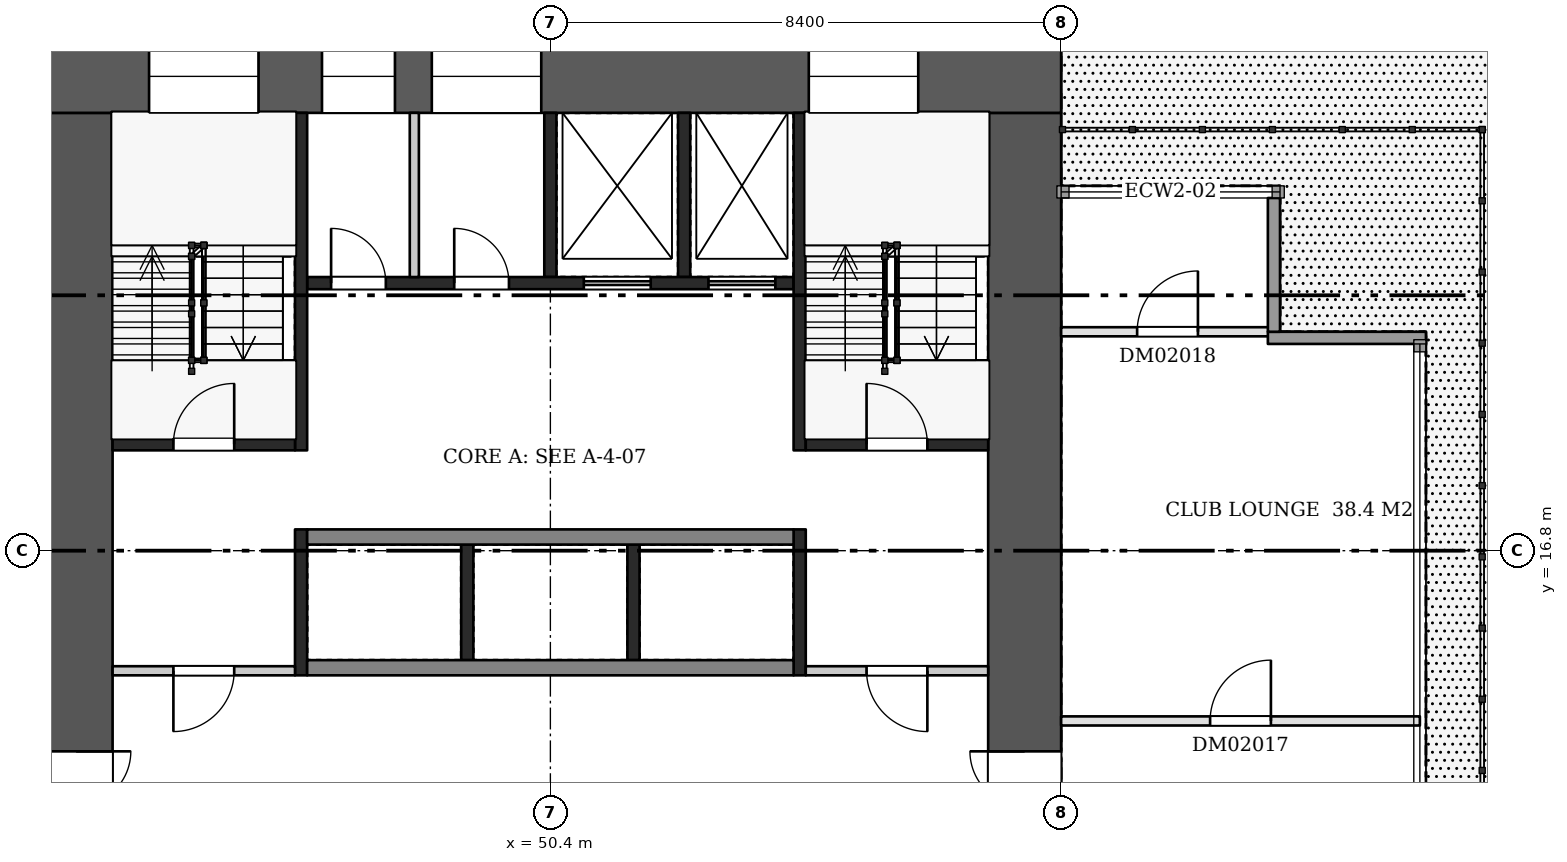
"""IFC4 building model, lengths in metres.
Left out: names, types, materials, properties, quantities, classifications, styles, units other than length and angle.
Written with IfcOpenShell. Run it as: python <this file> out.ifc"""

import sys

from ifc_helpers import new_model, si_unit, direction, frame, frame_2d, origin, place, context, subcontext, project, spatial, rectangle, extrude, element, fill, save


model = new_model("IFC4")
c1 = context("Model", 3, precision=1e-05, world=origin(), true_north=direction((0.0, 1.0)))
c2 = subcontext(c1, "Body", "Model", "MODEL_VIEW")
j1 = project(units=[si_unit("LENGTHUNIT", "METRE"), si_unit("PLANEANGLEUNIT", "RADIAN")], contexts=[c1])
p1 = place(None, origin())
s1 = spatial("IfcSite", under=j1, at=p1, CompositionType="ELEMENT")
p2 = place(p1, origin())
s2 = spatial("IfcBuilding", under=s1, at=p2, CompositionType="ELEMENT")
p3 = place(p2, frame((0.0, 0.0, 14.4)))
s3 = spatial("IfcBuildingStorey", under=s2, at=p3, CompositionType="ELEMENT", Elevation=14.4)
p4 = place(p3, frame((42.0, 24.6, 0.0), z_axis=(0.0, 0.0, 1.0), x_axis=(1.0, 0.0, 0.0)))
e1 = element("IfcWall", 1, at=p4, inside=s3, PredefinedType="SHEAR", context=c2, shape_type="SweptSolid", body=[
    extrude(rectangle(XDim=16.8, YDim=1.2, at=frame_2d((8.4, 0.0))), origin(), (0.0, 0.0, 1.0), 5.1),
])
p5 = place(p4, frame((1.8, 0.0, 0.5)))
e2 = element("IfcOpeningElement", 2, at=p5, cuts=e1, PredefinedType="OPENING", context=c2, shape_type="SweptSolid", body=[
    extrude(rectangle(XDim=1.8, YDim=2.4, at=frame_2d((0.9, 1.2))), frame((0.0, 0.61, 0.0), z_axis=(0.0, -1.0, 0.0), x_axis=(1.0, 0.0, 0.0)), (0.0, 0.0, 1.0), 1.22),
])
p6 = place(p4, frame((4.644, 0.0, 1.6)))
e3 = element("IfcOpeningElement", 3, at=p6, cuts=e1, PredefinedType="OPENING", context=c2, shape_type="SweptSolid", body=[
    extrude(rectangle(XDim=1.2, YDim=1.2, at=frame_2d((0.6, 0.6))), frame((0.0, 0.61, 0.0), z_axis=(0.0, -1.0, 0.0), x_axis=(1.0, 0.0, 0.0)), (0.0, 0.0, 1.0), 1.22),
])
p7 = place(p4, frame((6.45, 0.0, 1.6)))
e4 = element("IfcOpeningElement", 4, at=p7, cuts=e1, PredefinedType="OPENING", context=c2, shape_type="SweptSolid", body=[
    extrude(rectangle(XDim=1.8, YDim=1.2, at=frame_2d((0.9, 0.6))), frame((0.0, 0.61, 0.0), z_axis=(0.0, -1.0, 0.0), x_axis=(1.0, 0.0, 0.0)), (0.0, 0.0, 1.0), 1.22),
])
p8 = place(p4, frame((12.65, 0.0, 0.5)))
e5 = element("IfcOpeningElement", 5, at=p8, cuts=e1, PredefinedType="OPENING", context=c2, shape_type="SweptSolid", body=[
    extrude(rectangle(XDim=1.8, YDim=2.4, at=frame_2d((0.9, 1.2))), frame((0.0, 0.61, 0.0), z_axis=(0.0, -1.0, 0.0), x_axis=(1.0, 0.0, 0.0)), (0.0, 0.0, 1.0), 1.22),
])
p9 = place(p3, frame((42.6, 9.6, 0.0), z_axis=(0.0, 0.0, 1.0), x_axis=(0.0, 1.0, 0.0)))
e6 = element("IfcWall", 6, at=p9, inside=s3, PredefinedType="SHEAR", context=c2, shape_type="SweptSolid", body=[
    extrude(rectangle(XDim=14.4, YDim=1.2, at=frame_2d((7.2, 0.0))), origin(), (0.0, 0.0, 1.0), 5.1),
])
p10 = place(p9, frame((2.1, 0.0, 0.0)))
e7 = element("IfcOpeningElement", 7, at=p10, cuts=e6, PredefinedType="OPENING", context=c2, shape_type="SweptSolid", body=[
    extrude(rectangle(XDim=1.8, YDim=2.1, at=frame_2d((0.9, 1.05))), frame((0.0, 0.61, 0.0), z_axis=(0.0, -1.0, 0.0), x_axis=(1.0, 0.0, 0.0)), (0.0, 0.0, 1.0), 1.22),
])
p11 = place(p3, frame((58.2, 9.6, 0.0), z_axis=(0.0, 0.0, 1.0), x_axis=(0.0, 1.0, 0.0)))
e8 = element("IfcWall", 8, at=p11, inside=s3, PredefinedType="SHEAR", context=c2, shape_type="SweptSolid", body=[
    extrude(rectangle(XDim=14.4, YDim=1.2, at=frame_2d((7.2, 0.0))), origin(), (0.0, 0.0, 1.0), 5.1),
])
p12 = place(p11, frame((2.1, 0.0, 0.0)))
e9 = element("IfcOpeningElement", 9, at=p12, cuts=e8, PredefinedType="OPENING", context=c2, shape_type="SweptSolid", body=[
    extrude(rectangle(XDim=1.8, YDim=2.1, at=frame_2d((0.9, 1.05))), frame((0.0, 0.61, 0.0), z_axis=(0.0, -1.0, 0.0), x_axis=(1.0, 0.0, 0.0)), (0.0, 0.0, 1.0), 1.22),
])
for number, where, z_axis, x_axis in (
    (10, (49.033, 15.0, 0.0), (0.0, 0.0, 1.0), (0.0, 1.0, 0.0)),
    (11, (51.767, 15.0, 0.0), (0.0, 0.0, 1.0), (0.0, 1.0, 0.0)),
):
    element("IfcWall", number, at=place(p3, frame(where, z_axis=z_axis, x_axis=x_axis)), inside=s3, PredefinedType="SHEAR", context=c2, shape_type="SweptSolid", body=[
        extrude(rectangle(XDim=1.9, YDim=0.2, at=frame_2d((0.95, 0.0))), origin(), (0.0, 0.0, 1.0), 5.1),
    ])
for number, where, z_axis, x_axis in (
    (12, (46.4, 14.875, 0.0), (0.0, 0.0, 1.0), (1.0, 0.0, 0.0)),
    (13, (46.4, 17.025, 0.0), (0.0, 0.0, 1.0), (1.0, 0.0, 0.0)),
):
    element("IfcWall", number, at=place(p3, frame(where, z_axis=z_axis, x_axis=x_axis)), inside=s3, PredefinedType="SHEAR", context=c2, shape_type="SweptSolid", body=[
        extrude(rectangle(XDim=8.0, YDim=0.25, at=frame_2d((4.0, 0.0))), origin(), (0.0, 0.0, 1.0), 5.1),
    ])
for number, where, z_axis, x_axis in (
    (14, (50.4, 21.3, 0.0), (0.0, 0.0, 1.0), (0.0, 1.0, 0.0)),
    (15, (52.6, 21.3, 0.0), (0.0, 0.0, 1.0), (0.0, 1.0, 0.0)),
):
    element("IfcWall", number, at=place(p3, frame(where, z_axis=z_axis, x_axis=x_axis)), inside=s3, PredefinedType="SHEAR", context=c2, shape_type="SweptSolid", body=[
        extrude(rectangle(XDim=2.7, YDim=0.2, at=frame_2d((1.35, 0.0))), origin(), (0.0, 0.0, 1.0), 5.1),
    ])
p13 = place(p3, frame((48.163, 21.3, 0.0), z_axis=(0.0, 0.0, 1.0), x_axis=(0.0, 1.0, 0.0)))
e16 = element("IfcWall", 16, at=p13, inside=s3, PredefinedType="PARTITIONING", context=c2, shape_type="SweptSolid", body=[
    extrude(rectangle(XDim=2.7, YDim=0.15, at=frame_2d((1.35, 0.0))), origin(), (0.0, 0.0, 1.0), 5.1),
])
p14 = place(p3, frame((46.4, 21.2, 0.0), z_axis=(0.0, 0.0, 1.0), x_axis=(1.0, 0.0, 0.0)))
e17 = element("IfcWall", 17, at=p14, inside=s3, PredefinedType="SHEAR", context=c2, shape_type="SweptSolid", body=[
    extrude(rectangle(XDim=8.0, YDim=0.2, at=frame_2d((4.0, 0.0))), origin(), (0.0, 0.0, 1.0), 5.1),
])
p15 = place(p14, frame((0.394, 0.0, 0.0)))
e18 = element("IfcOpeningElement", 18, at=p15, cuts=e17, PredefinedType="OPENING", context=c2, shape_type="SweptSolid", body=[
    extrude(rectangle(XDim=0.9, YDim=2.1, at=frame_2d((0.45, 1.05))), frame((0.0, 0.11, 0.0), z_axis=(0.0, -1.0, 0.0), x_axis=(1.0, 0.0, 0.0)), (0.0, 0.0, 1.0), 0.22),
])
p16 = place(p14, frame((2.419, 0.0, 0.0)))
e19 = element("IfcOpeningElement", 19, at=p16, cuts=e17, PredefinedType="OPENING", context=c2, shape_type="SweptSolid", body=[
    extrude(rectangle(XDim=0.9, YDim=2.1, at=frame_2d((0.45, 1.05))), frame((0.0, 0.11, 0.0), z_axis=(0.0, -1.0, 0.0), x_axis=(1.0, 0.0, 0.0)), (0.0, 0.0, 1.0), 0.22),
])
p17 = place(p14, frame((4.55, 0.0, 0.0)))
e20 = element("IfcOpeningElement", 20, at=p17, cuts=e17, PredefinedType="OPENING", context=c2, shape_type="SweptSolid", body=[
    extrude(rectangle(XDim=1.1, YDim=2.1, at=frame_2d((0.55, 1.05))), frame((0.0, 0.11, 0.0), z_axis=(0.0, -1.0, 0.0), x_axis=(1.0, 0.0, 0.0)), (0.0, 0.0, 1.0), 0.22),
])
p18 = place(p14, frame((6.6, 0.0, 0.0)))
e21 = element("IfcOpeningElement", 21, at=p18, cuts=e17, PredefinedType="OPENING", context=c2, shape_type="SweptSolid", body=[
    extrude(rectangle(XDim=1.1, YDim=2.1, at=frame_2d((0.55, 1.05))), frame((0.0, 0.11, 0.0), z_axis=(0.0, -1.0, 0.0), x_axis=(1.0, 0.0, 0.0)), (0.0, 0.0, 1.0), 0.22),
])
p19 = place(p3, frame((46.3, 14.75, 0.0), z_axis=(0.0, 0.0, 1.0), x_axis=(0.0, 1.0, 0.0)))
e22 = element("IfcWall", 22, at=p19, inside=s3, PredefinedType="SHEAR", context=c2, shape_type="SweptSolid", body=[
    extrude(rectangle(XDim=2.4, YDim=0.2, at=frame_2d((1.2, 0.0))), origin(), (0.0, 0.0, 1.0), 5.1),
])
p20 = place(p3, frame((46.3, 18.45, 0.0), z_axis=(0.0, 0.0, 1.0), x_axis=(0.0, 1.0, 0.0)))
e23 = element("IfcWall", 23, at=p20, inside=s3, PredefinedType="SHEAR", context=c2, shape_type="SweptSolid", body=[
    extrude(rectangle(XDim=5.55, YDim=0.2, at=frame_2d((2.775, 0.0))), origin(), (0.0, 0.0, 1.0), 5.1),
])
p21 = place(p3, frame((43.2, 14.825, 0.0), z_axis=(0.0, 0.0, 1.0), x_axis=(1.0, 0.0, 0.0)))
e24 = element("IfcWall", 24, at=p21, inside=s3, PredefinedType="PARTITIONING", context=c2, shape_type="SweptSolid", body=[
    extrude(rectangle(XDim=3.0, YDim=0.15, at=frame_2d((1.5, 0.0))), origin(), (0.0, 0.0, 1.0), 5.1),
])
p22 = place(p21, frame((1.0, 0.0, 0.0)))
e25 = element("IfcOpeningElement", 25, at=p22, cuts=e24, PredefinedType="OPENING", context=c2, shape_type="SweptSolid", body=[
    extrude(rectangle(XDim=1.0, YDim=2.1, at=frame_2d((0.5, 1.05))), frame((0.0, 0.085, 0.0), z_axis=(0.0, -1.0, 0.0), x_axis=(1.0, 0.0, 0.0)), (0.0, 0.0, 1.0), 0.17),
])
p23 = place(p3, frame((43.2, 18.55, 0.0), z_axis=(0.0, 0.0, 1.0), x_axis=(1.0, 0.0, 0.0)))
e26 = element("IfcWall", 26, at=p23, inside=s3, PredefinedType="SHEAR", context=c2, shape_type="SweptSolid", body=[
    extrude(rectangle(XDim=3.0, YDim=0.2, at=frame_2d((1.5, 0.0))), origin(), (0.0, 0.0, 1.0), 5.1),
])
p24 = place(p23, frame((1.0, 0.0, 0.0)))
e27 = element("IfcOpeningElement", 27, at=p24, cuts=e26, PredefinedType="OPENING", context=c2, shape_type="SweptSolid", body=[
    extrude(rectangle(XDim=1.0, YDim=2.1, at=frame_2d((0.5, 1.05))), frame((0.0, 0.11, 0.0), z_axis=(0.0, -1.0, 0.0), x_axis=(1.0, 0.0, 0.0)), (0.0, 0.0, 1.0), 0.22),
])
p25 = place(p3, frame((54.5, 14.75, 0.0), z_axis=(0.0, 0.0, 1.0), x_axis=(0.0, 1.0, 0.0)))
e28 = element("IfcWall", 28, at=p25, inside=s3, PredefinedType="SHEAR", context=c2, shape_type="SweptSolid", body=[
    extrude(rectangle(XDim=2.4, YDim=0.2, at=frame_2d((1.2, 0.0))), origin(), (0.0, 0.0, 1.0), 5.1),
])
p26 = place(p3, frame((54.5, 18.45, 0.0), z_axis=(0.0, 0.0, 1.0), x_axis=(0.0, 1.0, 0.0)))
e29 = element("IfcWall", 29, at=p26, inside=s3, PredefinedType="SHEAR", context=c2, shape_type="SweptSolid", body=[
    extrude(rectangle(XDim=5.55, YDim=0.2, at=frame_2d((2.775, 0.0))), origin(), (0.0, 0.0, 1.0), 5.1),
])
p27 = place(p3, frame((54.6, 14.825, 0.0), z_axis=(0.0, 0.0, 1.0), x_axis=(1.0, 0.0, 0.0)))
e30 = element("IfcWall", 30, at=p27, inside=s3, PredefinedType="PARTITIONING", context=c2, shape_type="SweptSolid", body=[
    extrude(rectangle(XDim=3.0, YDim=0.15, at=frame_2d((1.5, 0.0))), origin(), (0.0, 0.0, 1.0), 5.1),
])
p28 = place(p27, frame((1.0, 0.0, 0.0)))
e31 = element("IfcOpeningElement", 31, at=p28, cuts=e30, PredefinedType="OPENING", context=c2, shape_type="SweptSolid", body=[
    extrude(rectangle(XDim=1.0, YDim=2.1, at=frame_2d((0.5, 1.05))), frame((0.0, 0.085, 0.0), z_axis=(0.0, -1.0, 0.0), x_axis=(1.0, 0.0, 0.0)), (0.0, 0.0, 1.0), 0.17),
])
p29 = place(p3, frame((54.6, 18.55, 0.0), z_axis=(0.0, 0.0, 1.0), x_axis=(1.0, 0.0, 0.0)))
e32 = element("IfcWall", 32, at=p29, inside=s3, PredefinedType="SHEAR", context=c2, shape_type="SweptSolid", body=[
    extrude(rectangle(XDim=3.0, YDim=0.2, at=frame_2d((1.5, 0.0))), origin(), (0.0, 0.0, 1.0), 5.1),
])
p30 = place(p29, frame((1.0, 0.0, 0.0)))
e33 = element("IfcOpeningElement", 33, at=p30, cuts=e32, PredefinedType="OPENING", context=c2, shape_type="SweptSolid", body=[
    extrude(rectangle(XDim=1.0, YDim=2.1, at=frame_2d((0.5, 1.05))), frame((0.0, 0.11, 0.0), z_axis=(0.0, -1.0, 0.0), x_axis=(1.0, 0.0, 0.0)), (0.0, 0.0, 1.0), 0.22),
])
p31 = place(p3, frame((58.8, 14.0, 0.0), z_axis=(0.0, 0.0, 1.0), x_axis=(1.0, 0.0, 0.0)))
e34 = element("IfcWall", 34, at=p31, inside=s3, PredefinedType="PARTITIONING", context=c2, shape_type="SweptSolid", body=[
    extrude(rectangle(XDim=5.9, YDim=0.15, at=frame_2d((2.95, 0.0))), origin(), (0.0, 0.0, 1.0), 5.1),
])
p32 = place(p31, frame((2.45, 0.0, 0.0)))
e35 = element("IfcOpeningElement", 35, at=p32, cuts=e34, PredefinedType="OPENING", context=c2, shape_type="SweptSolid", body=[
    extrude(rectangle(XDim=1.0, YDim=2.1, at=frame_2d((0.5, 1.05))), frame((0.0, 0.085, 0.0), z_axis=(0.0, -1.0, 0.0), x_axis=(1.0, 0.0, 0.0)), (0.0, 0.0, 1.0), 0.17),
])
p33 = place(p3, frame((58.8, 20.4, 0.0), z_axis=(0.0, 0.0, 1.0), x_axis=(1.0, 0.0, 0.0)))
e36 = element("IfcWall", 36, at=p33, inside=s3, PredefinedType="PARTITIONING", context=c2, shape_type="SweptSolid", body=[
    extrude(rectangle(XDim=3.5, YDim=0.15, at=frame_2d((1.75, 0.0))), origin(), (0.0, 0.0, 1.0), 5.1),
])
p34 = place(p33, frame((1.25, 0.0, 0.0)))
e37 = element("IfcOpeningElement", 37, at=p34, cuts=e36, PredefinedType="OPENING", context=c2, shape_type="SweptSolid", body=[
    extrude(rectangle(XDim=1.0, YDim=2.1, at=frame_2d((0.5, 1.05))), frame((0.0, 0.085, 0.0), z_axis=(0.0, -1.0, 0.0), x_axis=(1.0, 0.0, 0.0)), (0.0, 0.0, 1.0), 0.17),
])
p35 = place(p3, frame((64.8, 20.3, 0.0), z_axis=(0.0, 0.0, 1.0), x_axis=(-1.0, 0.0, 0.0)))
e38 = element("IfcWall", 38, at=p35, inside=s3, PredefinedType="SOLIDWALL", context=c2, shape_type="SweptSolid", body=[
    extrude(rectangle(XDim=2.6, YDim=0.2, at=frame_2d((1.3, 0.0))), origin(), (0.0, 0.0, 1.0), 5.1),
])
p36 = place(p3, frame((62.3, 20.4, 0.0), z_axis=(0.0, 0.0, 1.0), x_axis=(0.0, 1.0, 0.0)))
e39 = element("IfcWall", 39, at=p36, inside=s3, PredefinedType="SOLIDWALL", context=c2, shape_type="SweptSolid", body=[
    extrude(rectangle(XDim=2.2, YDim=0.2, at=frame_2d((1.1, 0.0))), origin(), (0.0, 0.0, 1.0), 5.1),
])
p37 = place(p10, frame((1.8, 0.0, 0.0), z_axis=(0.0, 0.0, 1.0), x_axis=(-1.0, 0.0, 0.0)))
e40 = element("IfcDoor", 40, at=p37, inside=s3, OperationType="DOUBLE_DOOR_SINGLE_SWING", PredefinedType="DOOR", context=c2, shape_type="SweptSolid", body=[
    extrude(rectangle(XDim=1.8, YDim=2.1, at=frame_2d((0.9, 1.05))), frame((0.0, 0.025, 0.0), z_axis=(0.0, -1.0, 0.0), x_axis=(1.0, 0.0, 0.0)), (0.0, 0.0, 1.0), 0.05),
])
fill(e7, e40)
p38 = place(p12, origin())
e41 = element("IfcDoor", 41, at=p38, inside=s3, OperationType="DOUBLE_DOOR_SINGLE_SWING", PredefinedType="DOOR", context=c2, shape_type="SweptSolid", body=[
    extrude(rectangle(XDim=1.8, YDim=2.1, at=frame_2d((0.9, 1.05))), frame((0.0, 0.025, 0.0), z_axis=(0.0, -1.0, 0.0), x_axis=(1.0, 0.0, 0.0)), (0.0, 0.0, 1.0), 0.05),
])
fill(e9, e41)
p39 = place(p15, origin())
e42 = element("IfcDoor", 42, at=p39, inside=s3, OperationType="SINGLE_SWING_LEFT", PredefinedType="DOOR", context=c2, shape_type="SweptSolid", body=[
    extrude(rectangle(XDim=0.9, YDim=2.1, at=frame_2d((0.45, 1.05))), frame((0.0, 0.025, 0.0), z_axis=(0.0, -1.0, 0.0), x_axis=(1.0, 0.0, 0.0)), (0.0, 0.0, 1.0), 0.05),
])
fill(e18, e42)
p40 = place(p16, origin())
e43 = element("IfcDoor", 43, at=p40, inside=s3, OperationType="SINGLE_SWING_LEFT", PredefinedType="DOOR", context=c2, shape_type="SweptSolid", body=[
    extrude(rectangle(XDim=0.9, YDim=2.1, at=frame_2d((0.45, 1.05))), frame((0.0, 0.025, 0.0), z_axis=(0.0, -1.0, 0.0), x_axis=(1.0, 0.0, 0.0)), (0.0, 0.0, 1.0), 0.05),
])
fill(e19, e43)
p41 = place(p17, origin())
e44 = element("IfcDoor", 44, at=p41, inside=s3, OperationType="DOUBLE_DOOR_SLIDING", PredefinedType="DOOR", context=c2, shape_type="SweptSolid", body=[
    extrude(rectangle(XDim=1.1, YDim=2.1, at=frame_2d((0.55, 1.05))), frame((0.0, 0.025, 0.0), z_axis=(0.0, -1.0, 0.0), x_axis=(1.0, 0.0, 0.0)), (0.0, 0.0, 1.0), 0.05),
])
fill(e20, e44)
p42 = place(p18, origin())
e45 = element("IfcDoor", 45, at=p42, inside=s3, OperationType="DOUBLE_DOOR_SLIDING", PredefinedType="DOOR", context=c2, shape_type="SweptSolid", body=[
    extrude(rectangle(XDim=1.1, YDim=2.1, at=frame_2d((0.55, 1.05))), frame((0.0, 0.025, 0.0), z_axis=(0.0, -1.0, 0.0), x_axis=(1.0, 0.0, 0.0)), (0.0, 0.0, 1.0), 0.05),
])
fill(e21, e45)
p43 = place(p22, frame((1.0, 0.0, 0.0), z_axis=(0.0, 0.0, 1.0), x_axis=(-1.0, 0.0, 0.0)))
e46 = element("IfcDoor", 46, at=p43, inside=s3, OperationType="SINGLE_SWING_RIGHT", PredefinedType="DOOR", context=c2, shape_type="SweptSolid", body=[
    extrude(rectangle(XDim=1.0, YDim=2.1, at=frame_2d((0.5, 1.05))), frame((0.0, 0.025, 0.0), z_axis=(0.0, -1.0, 0.0), x_axis=(1.0, 0.0, 0.0)), (0.0, 0.0, 1.0), 0.05),
])
fill(e25, e46)
p44 = place(p24, origin())
e47 = element("IfcDoor", 47, at=p44, inside=s3, OperationType="SINGLE_SWING_RIGHT", PredefinedType="DOOR", context=c2, shape_type="SweptSolid", body=[
    extrude(rectangle(XDim=1.0, YDim=2.1, at=frame_2d((0.5, 1.05))), frame((0.0, 0.025, 0.0), z_axis=(0.0, -1.0, 0.0), x_axis=(1.0, 0.0, 0.0)), (0.0, 0.0, 1.0), 0.05),
])
fill(e27, e47)
p45 = place(p28, frame((1.0, 0.0, 0.0), z_axis=(0.0, 0.0, 1.0), x_axis=(-1.0, 0.0, 0.0)))
e48 = element("IfcDoor", 48, at=p45, inside=s3, OperationType="SINGLE_SWING_LEFT", PredefinedType="DOOR", context=c2, shape_type="SweptSolid", body=[
    extrude(rectangle(XDim=1.0, YDim=2.1, at=frame_2d((0.5, 1.05))), frame((0.0, 0.025, 0.0), z_axis=(0.0, -1.0, 0.0), x_axis=(1.0, 0.0, 0.0)), (0.0, 0.0, 1.0), 0.05),
])
fill(e31, e48)
p46 = place(p30, origin())
e49 = element("IfcDoor", 49, at=p46, inside=s3, OperationType="SINGLE_SWING_LEFT", PredefinedType="DOOR", context=c2, shape_type="SweptSolid", body=[
    extrude(rectangle(XDim=1.0, YDim=2.1, at=frame_2d((0.5, 1.05))), frame((0.0, 0.025, 0.0), z_axis=(0.0, -1.0, 0.0), x_axis=(1.0, 0.0, 0.0)), (0.0, 0.0, 1.0), 0.05),
])
fill(e33, e49)
p47 = place(p5, origin())
e50 = element("IfcWindow", 50, at=p47, inside=s3, PartitioningType="SINGLE_PANEL", PredefinedType="WINDOW", context=c2, shape_type="SweptSolid", body=[
    extrude(rectangle(XDim=1.8, YDim=2.4, at=frame_2d((0.9, 1.2))), frame((0.0, 0.03, 0.0), z_axis=(0.0, -1.0, 0.0), x_axis=(1.0, 0.0, 0.0)), (0.0, 0.0, 1.0), 0.06),
])
fill(e2, e50)
p48 = place(p6, origin())
e51 = element("IfcWindow", 51, at=p48, inside=s3, PartitioningType="SINGLE_PANEL", PredefinedType="WINDOW", context=c2, shape_type="SweptSolid", body=[
    extrude(rectangle(XDim=1.2, YDim=1.2, at=frame_2d((0.6, 0.6))), frame((0.0, 0.03, 0.0), z_axis=(0.0, -1.0, 0.0), x_axis=(1.0, 0.0, 0.0)), (0.0, 0.0, 1.0), 0.06),
])
fill(e3, e51)
p49 = place(p7, origin())
e52 = element("IfcWindow", 52, at=p49, inside=s3, PartitioningType="SINGLE_PANEL", PredefinedType="WINDOW", context=c2, shape_type="SweptSolid", body=[
    extrude(rectangle(XDim=1.8, YDim=1.2, at=frame_2d((0.9, 0.6))), frame((0.0, 0.03, 0.0), z_axis=(0.0, -1.0, 0.0), x_axis=(1.0, 0.0, 0.0)), (0.0, 0.0, 1.0), 0.06),
])
fill(e4, e52)
p50 = place(p8, origin())
e53 = element("IfcWindow", 53, at=p50, inside=s3, PartitioningType="SINGLE_PANEL", PredefinedType="WINDOW", context=c2, shape_type="SweptSolid", body=[
    extrude(rectangle(XDim=1.8, YDim=2.4, at=frame_2d((0.9, 1.2))), frame((0.0, 0.03, 0.0), z_axis=(0.0, -1.0, 0.0), x_axis=(1.0, 0.0, 0.0)), (0.0, 0.0, 1.0), 0.06),
])
fill(e5, e53)
p51 = place(p32, origin())
e54 = element("IfcDoor", 54, at=p51, inside=s3, OperationType="SINGLE_SWING_RIGHT", PredefinedType="DOOR", context=c2, shape_type="SweptSolid", body=[
    extrude(rectangle(XDim=1.0, YDim=2.1, at=frame_2d((0.5, 1.05))), frame((0.0, 0.025, 0.0), z_axis=(0.0, -1.0, 0.0), x_axis=(1.0, 0.0, 0.0)), (0.0, 0.0, 1.0), 0.05),
])
fill(e35, e54)
p52 = place(p34, origin())
e55 = element("IfcDoor", 55, at=p52, inside=s3, OperationType="SINGLE_SWING_RIGHT", PredefinedType="DOOR", context=c2, shape_type="SweptSolid", body=[
    extrude(rectangle(XDim=1.0, YDim=2.1, at=frame_2d((0.5, 1.05))), frame((0.0, 0.025, 0.0), z_axis=(0.0, -1.0, 0.0), x_axis=(1.0, 0.0, 0.0)), (0.0, 0.0, 1.0), 0.05),
])
fill(e37, e55)
save(model, sys.argv[1])
